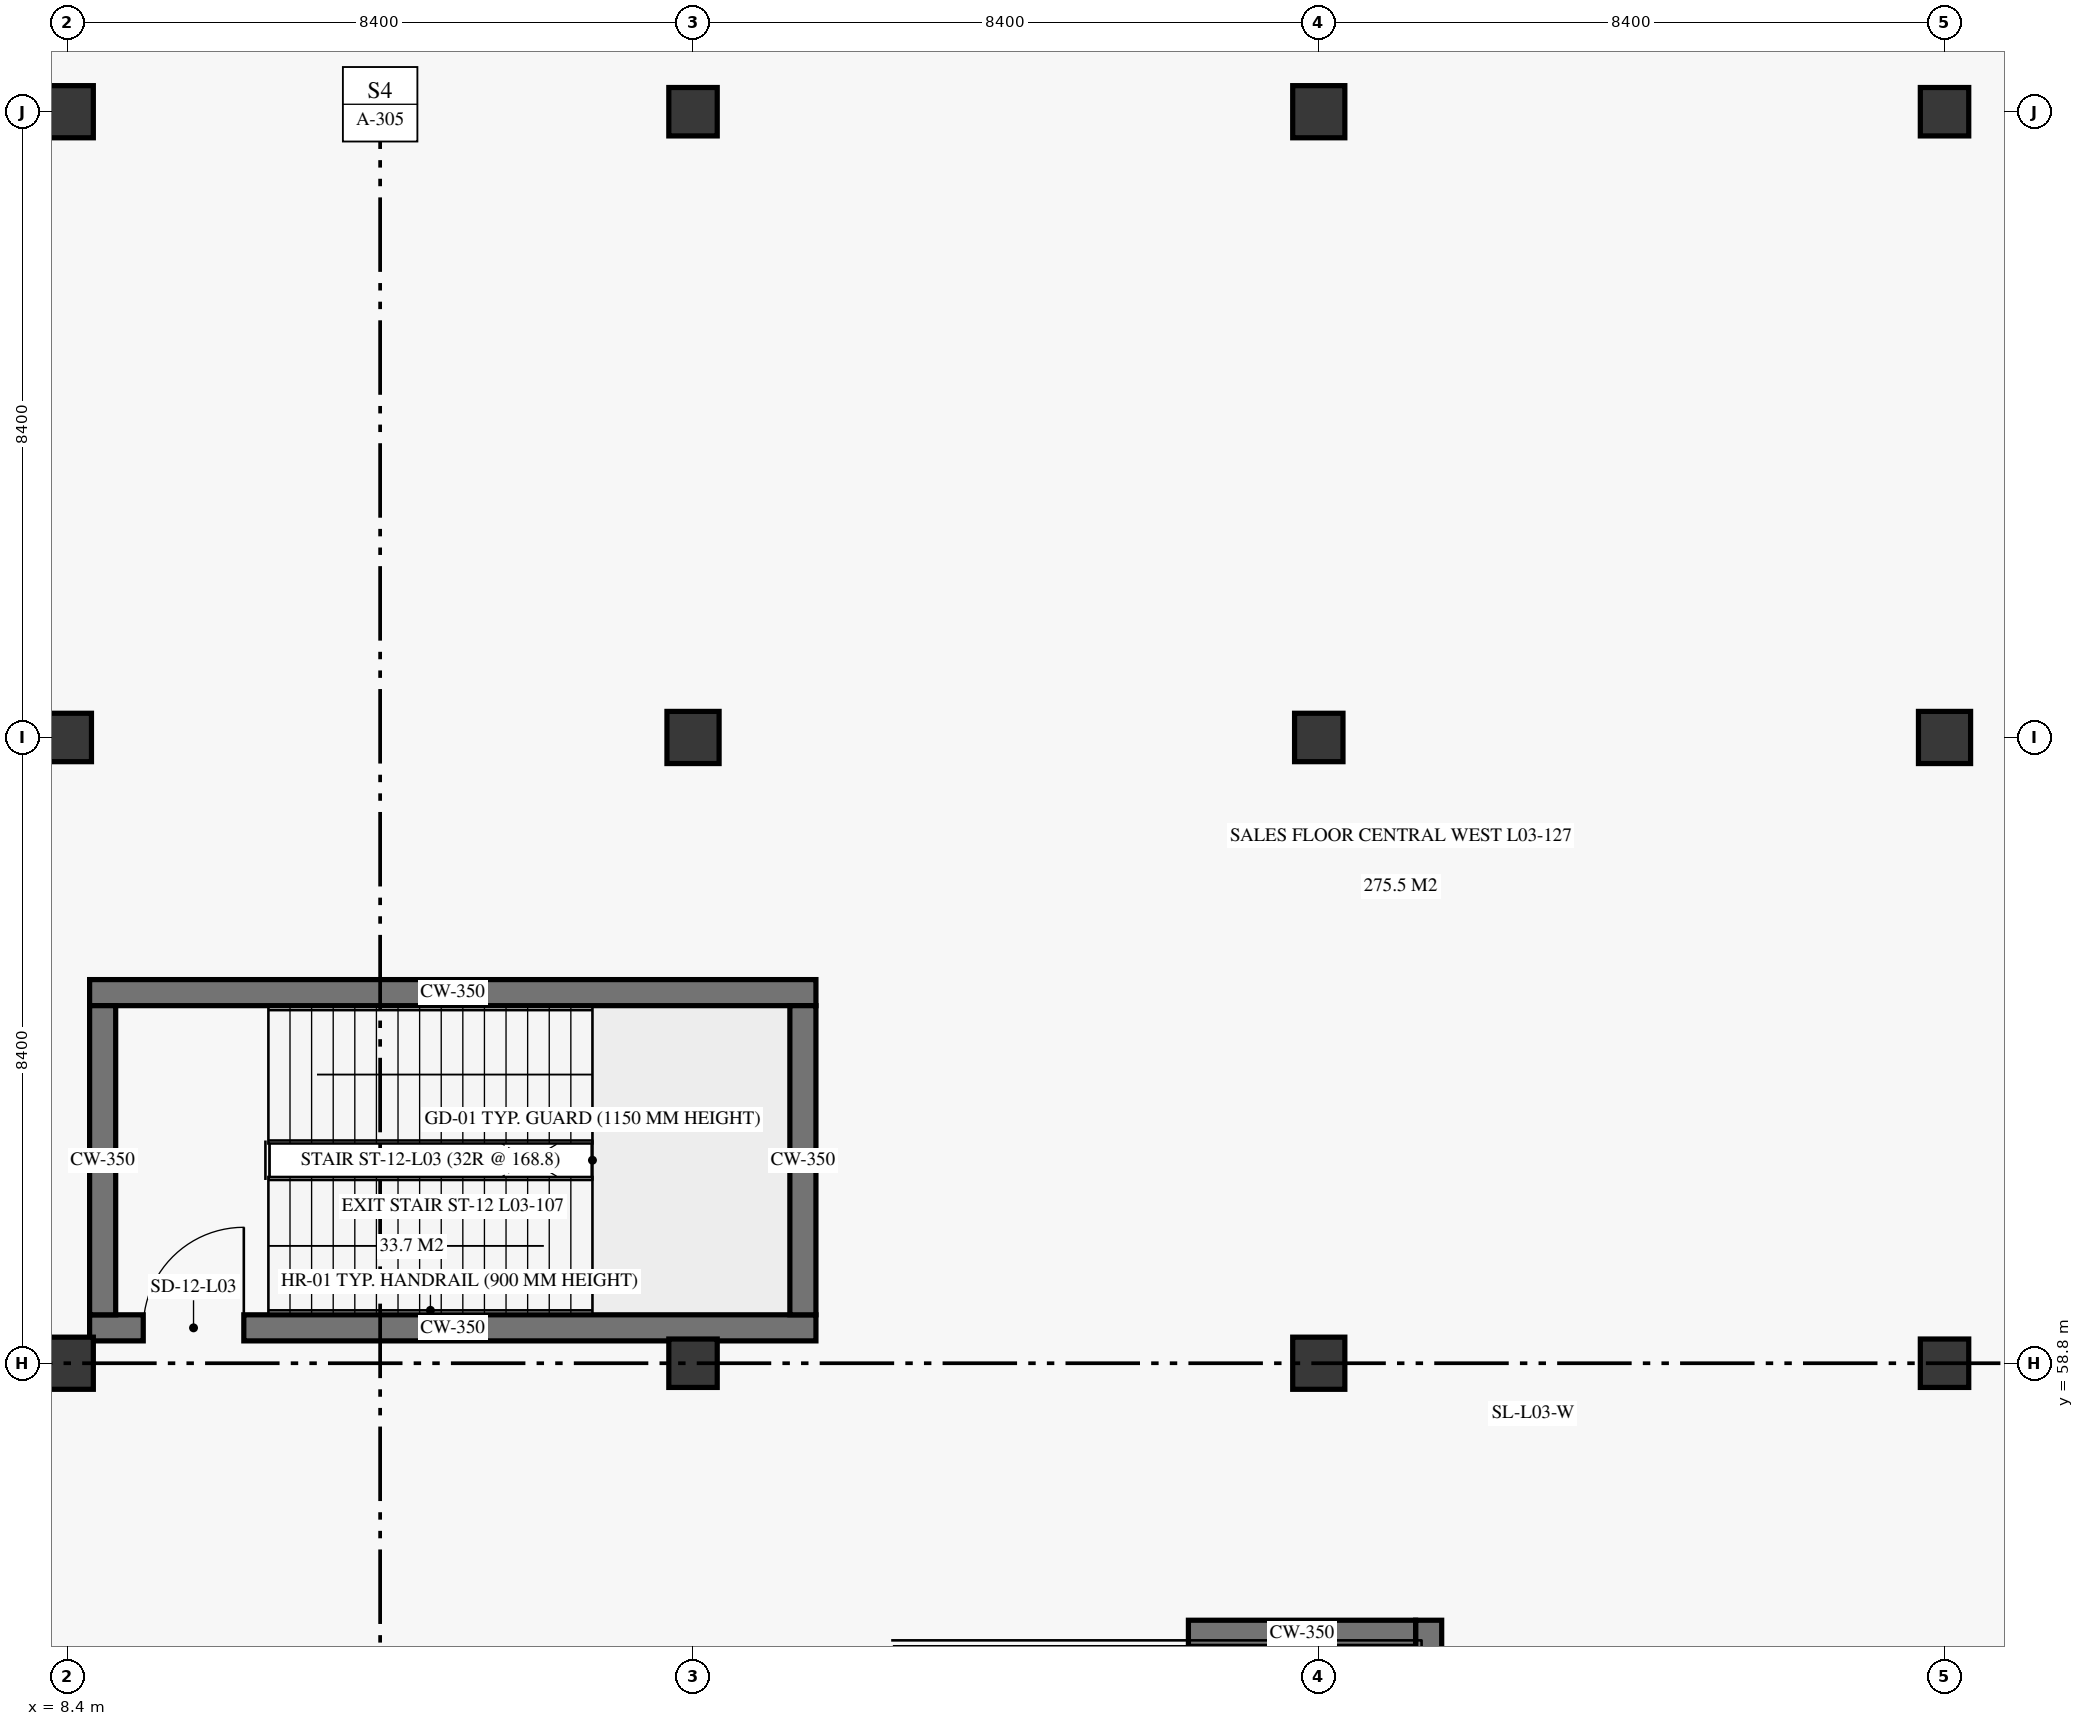
"""IFC4 building model, lengths in metres.
Left out: names, types, materials, properties, quantities, classifications, styles, units other than length and angle.
Written with IfcOpenShell. Run it as: python <this file> out.ifc"""

import sys

from ifc_helpers import new_model, si_unit, direction, frame, frame_2d, origin, origin_2d, place, context, subcontext, project, spatial, rectangle, extrude, element, fill, save


model = new_model("IFC4")
c1 = context("Model", 3, precision=1e-05, world=origin(), true_north=direction((0.0, 1.0)))
c2 = subcontext(c1, "Body", "Model", "MODEL_VIEW")
j1 = project(units=[si_unit("LENGTHUNIT", "METRE"), si_unit("PLANEANGLEUNIT", "RADIAN")], contexts=[c1])
p1 = place(None, origin())
s1 = spatial("IfcSite", under=j1, at=p1, CompositionType="ELEMENT")
p2 = place(p1, origin())
s2 = spatial("IfcBuilding", under=s1, at=p2, CompositionType="ELEMENT")
p3 = place(p2, frame((0.0, 0.0, 11.4)))
s3 = spatial("IfcBuildingStorey", under=s2, at=p3, CompositionType="ELEMENT", Elevation=11.4)
p4 = place(p3, frame((8.4, 58.8, 0.0), z_axis=(0.0, 0.0, 1.0), x_axis=(1.0, 0.0, 0.0)))
e1 = element("IfcColumn", 1, at=p4, inside=s3, PredefinedType="COLUMN", context=c2, shape_type="SweptSolid", body=[
    extrude(rectangle(XDim=0.7, YDim=0.7, at=origin_2d()), origin(), (0.0, 0.0, 1.0), 5.1),
])
p5 = place(p3, frame((8.4, 67.2, 0.0), z_axis=(0.0, 0.0, 1.0), x_axis=(1.0, 0.0, 0.0)))
e2 = element("IfcColumn", 2, at=p5, inside=s3, PredefinedType="COLUMN", context=c2, shape_type="SweptSolid", body=[
    extrude(rectangle(XDim=0.65, YDim=0.65, at=origin_2d()), origin(), (0.0, 0.0, 1.0), 5.1),
])
p6 = place(p3, frame((8.4, 75.6, 0.0), z_axis=(0.0, 0.0, 1.0), x_axis=(1.0, 0.0, 0.0)))
e3 = element("IfcColumn", 3, at=p6, inside=s3, PredefinedType="COLUMN", context=c2, shape_type="SweptSolid", body=[
    extrude(rectangle(XDim=0.7, YDim=0.7, at=origin_2d()), origin(), (0.0, 0.0, 1.0), 5.1),
])
p7 = place(p3, frame((16.8, 58.8, 0.0), z_axis=(0.0, 0.0, 1.0), x_axis=(1.0, 0.0, 0.0)))
e4 = element("IfcColumn", 4, at=p7, inside=s3, PredefinedType="COLUMN", context=c2, shape_type="SweptSolid", body=[
    extrude(rectangle(XDim=0.65, YDim=0.65, at=origin_2d()), origin(), (0.0, 0.0, 1.0), 5.1),
])
p8 = place(p3, frame((16.8, 67.2, 0.0), z_axis=(0.0, 0.0, 1.0), x_axis=(1.0, 0.0, 0.0)))
e5 = element("IfcColumn", 5, at=p8, inside=s3, PredefinedType="COLUMN", context=c2, shape_type="SweptSolid", body=[
    extrude(rectangle(XDim=0.7, YDim=0.7, at=origin_2d()), origin(), (0.0, 0.0, 1.0), 5.1),
])
p9 = place(p3, frame((16.8, 75.6, 0.0), z_axis=(0.0, 0.0, 1.0), x_axis=(1.0, 0.0, 0.0)))
e6 = element("IfcColumn", 6, at=p9, inside=s3, PredefinedType="COLUMN", context=c2, shape_type="SweptSolid", body=[
    extrude(rectangle(XDim=0.65, YDim=0.65, at=origin_2d()), origin(), (0.0, 0.0, 1.0), 5.1),
])
p10 = place(p3, frame((25.2, 58.8, 0.0), z_axis=(0.0, 0.0, 1.0), x_axis=(1.0, 0.0, 0.0)))
e7 = element("IfcColumn", 7, at=p10, inside=s3, PredefinedType="COLUMN", context=c2, shape_type="SweptSolid", body=[
    extrude(rectangle(XDim=0.7, YDim=0.7, at=origin_2d()), origin(), (0.0, 0.0, 1.0), 5.1),
])
p11 = place(p3, frame((25.2, 67.2, 0.0), z_axis=(0.0, 0.0, 1.0), x_axis=(1.0, 0.0, 0.0)))
e8 = element("IfcColumn", 8, at=p11, inside=s3, PredefinedType="COLUMN", context=c2, shape_type="SweptSolid", body=[
    extrude(rectangle(XDim=0.65, YDim=0.65, at=origin_2d()), origin(), (0.0, 0.0, 1.0), 5.1),
])
p12 = place(p3, frame((25.2, 75.6, 0.0), z_axis=(0.0, 0.0, 1.0), x_axis=(1.0, 0.0, 0.0)))
e9 = element("IfcColumn", 9, at=p12, inside=s3, PredefinedType="COLUMN", context=c2, shape_type="SweptSolid", body=[
    extrude(rectangle(XDim=0.7, YDim=0.7, at=origin_2d()), origin(), (0.0, 0.0, 1.0), 5.1),
])
p13 = place(p3, frame((33.6, 58.8, 0.0), z_axis=(0.0, 0.0, 1.0), x_axis=(1.0, 0.0, 0.0)))
e10 = element("IfcColumn", 10, at=p13, inside=s3, PredefinedType="COLUMN", context=c2, shape_type="SweptSolid", body=[
    extrude(rectangle(XDim=0.65, YDim=0.65, at=origin_2d()), origin(), (0.0, 0.0, 1.0), 5.1),
])
p14 = place(p3, frame((33.6, 67.2, 0.0), z_axis=(0.0, 0.0, 1.0), x_axis=(1.0, 0.0, 0.0)))
e11 = element("IfcColumn", 11, at=p14, inside=s3, PredefinedType="COLUMN", context=c2, shape_type="SweptSolid", body=[
    extrude(rectangle(XDim=0.7, YDim=0.7, at=origin_2d()), origin(), (0.0, 0.0, 1.0), 5.1),
])
p15 = place(p3, frame((33.6, 75.6, 0.0), z_axis=(0.0, 0.0, 1.0), x_axis=(1.0, 0.0, 0.0)))
e12 = element("IfcColumn", 12, at=p15, inside=s3, PredefinedType="COLUMN", context=c2, shape_type="SweptSolid", body=[
    extrude(rectangle(XDim=0.65, YDim=0.65, at=origin_2d()), origin(), (0.0, 0.0, 1.0), 5.1),
])
p16 = place(p3, frame((8.7, 59.275, 0.0), z_axis=(0.0, 0.0, 1.0), x_axis=(1.0, 0.0, 0.0)))
e13 = element("IfcWall", 13, at=p16, inside=s3, PredefinedType="SHEAR", context=c2, shape_type="SweptSolid", body=[
    extrude(rectangle(XDim=9.75, YDim=0.35, at=frame_2d((4.875, 0.0))), origin(), (0.0, 0.0, 1.0), 5.1),
])
p17 = place(p16, frame((0.72, 0.0, 0.0)))
e14 = element("IfcOpeningElement", 14, at=p17, cuts=e13, PredefinedType="OPENING", context=c2, shape_type="SweptSolid", body=[
    extrude(rectangle(XDim=1.35, YDim=2.25, at=frame_2d((0.675, 1.125))), frame((0.0, 0.185, 0.0), z_axis=(0.0, -1.0, 0.0), x_axis=(1.0, 0.0, 0.0)), (0.0, 0.0, 1.0), 0.37),
])
p18 = place(p3, frame((8.7, 63.775, 0.0), z_axis=(0.0, 0.0, 1.0), x_axis=(1.0, 0.0, 0.0)))
e15 = element("IfcWall", 15, at=p18, inside=s3, PredefinedType="SHEAR", context=c2, shape_type="SweptSolid", body=[
    extrude(rectangle(XDim=9.75, YDim=0.35, at=frame_2d((4.875, 0.0))), origin(), (0.0, 0.0, 1.0), 5.1),
])
for number, where, z_axis, x_axis in (
    (16, (8.875, 59.45, 0.0), (0.0, 0.0, 1.0), (0.0, 1.0, 0.0)),
    (17, (18.275, 59.45, 0.0), (0.0, 0.0, 1.0), (0.0, 1.0, 0.0)),
):
    element("IfcWall", number, at=place(p3, frame(where, z_axis=z_axis, x_axis=x_axis)), inside=s3, PredefinedType="SHEAR", context=c2, shape_type="SweptSolid", body=[
        extrude(rectangle(XDim=4.15, YDim=0.35, at=frame_2d((2.075, 0.0))), origin(), (0.0, 0.0, 1.0), 5.1),
    ])
p19 = place(p3, frame((26.675, 50.7, 0.0), z_axis=(0.0, 0.0, 1.0), x_axis=(0.0, 1.0, 0.0)))
e18 = element("IfcWall", 18, at=p19, inside=s3, PredefinedType="SHEAR", context=c2, shape_type="SweptSolid", body=[
    extrude(rectangle(XDim=4.65, YDim=0.35, at=frame_2d((2.325, 0.0))), origin(), (0.0, 0.0, 1.0), 2.5),
])
p20 = place(p3, frame((23.45, 55.175, 0.0), z_axis=(0.0, 0.0, 1.0), x_axis=(1.0, 0.0, 0.0)))
e19 = element("IfcWall", 19, at=p20, inside=s3, PredefinedType="SHEAR", context=c2, shape_type="SweptSolid", body=[
    extrude(rectangle(XDim=3.05, YDim=0.35, at=frame_2d((1.525, 0.0))), origin(), (0.0, 0.0, 1.0), 2.5),
])
p21 = place(p17, origin())
e20 = element("IfcDoor", 20, at=p21, inside=s3, OperationType="SINGLE_SWING_RIGHT", PredefinedType="DOOR", context=c2, shape_type="SweptSolid", body=[
    extrude(rectangle(XDim=1.35, YDim=2.25, at=frame_2d((0.675, 1.125))), frame((0.0, 0.025, 0.0), z_axis=(0.0, -1.0, 0.0), x_axis=(1.0, 0.0, 0.0)), (0.0, 0.0, 1.0), 0.05),
])
fill(e14, e20)
save(model, sys.argv[1])
